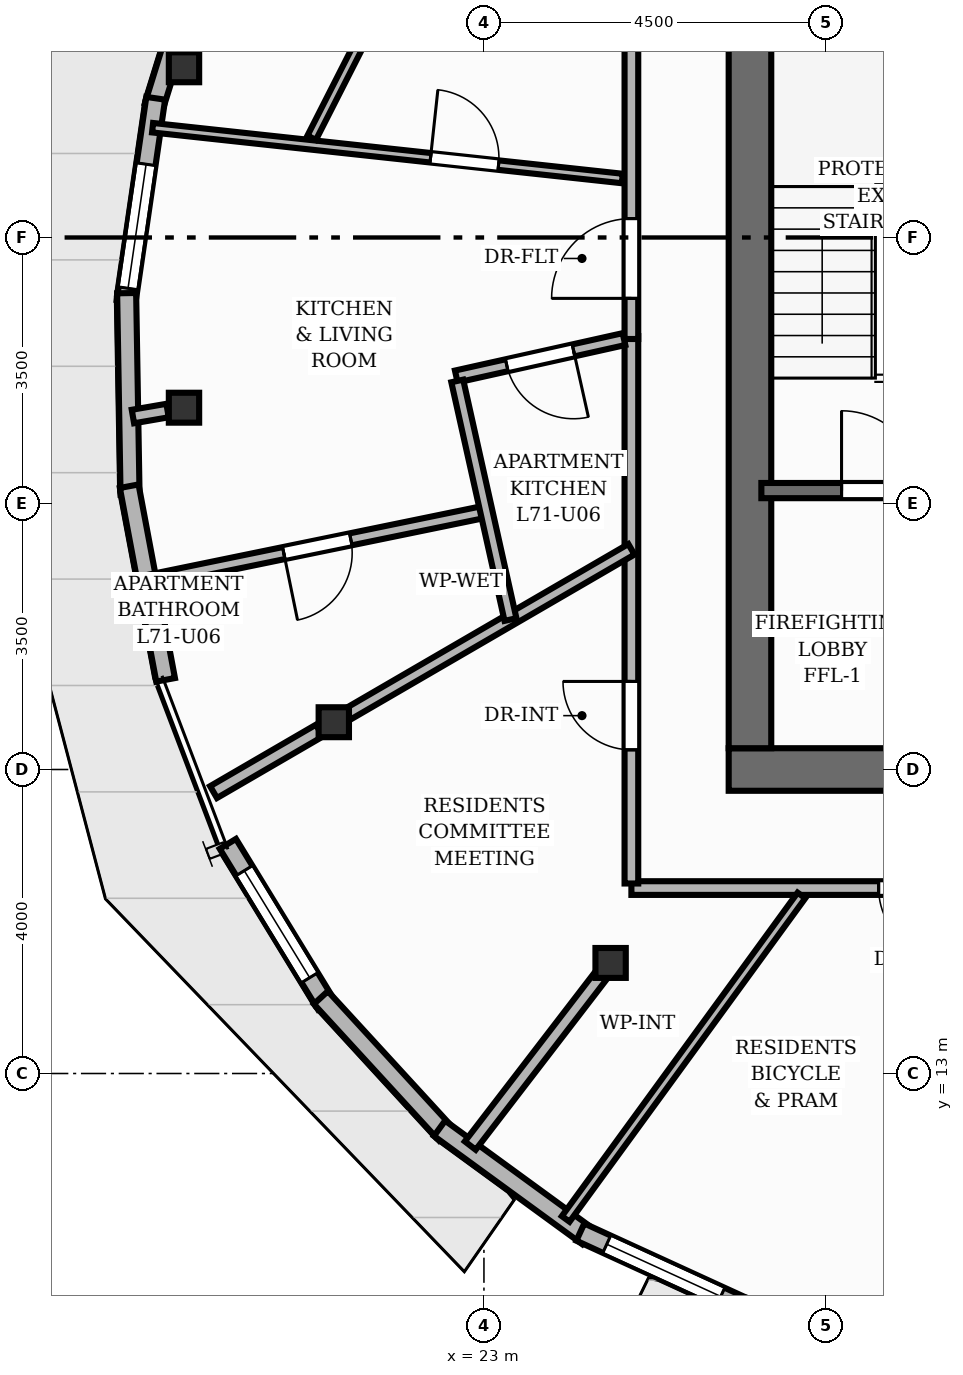
"""IFC4 building model, lengths in metres.
Left out: names, types, materials, properties, quantities, classifications, styles, units other than length and angle.
Written with IfcOpenShell. Run it as: python <this file> out.ifc"""

import sys

from ifc_helpers import new_model, si_unit, direction, frame, frame_2d, origin, origin_2d, place, context, subcontext, project, spatial, rectangle, i_section, extrude, element, fill, save


model = new_model("IFC4")
c1 = context("Model", 3, precision=1e-05, world=origin(), true_north=direction((0.0, 1.0)))
c2 = subcontext(c1, "Body", "Model", "MODEL_VIEW")
j1 = project(units=[si_unit("LENGTHUNIT", "METRE"), si_unit("PLANEANGLEUNIT", "RADIAN")], contexts=[c1])
p1 = place(None, origin())
s1 = spatial("IfcSite", under=j1, at=p1, CompositionType="ELEMENT")
p2 = place(p1, origin())
s2 = spatial("IfcBuilding", under=s1, at=p2, CompositionType="ELEMENT")
p3 = place(p2, frame((0.0, 0.0, 236.64)))
s3 = spatial("IfcBuildingStorey", under=s2, at=p3, CompositionType="ELEMENT", Elevation=236.64)
p4 = place(p3, frame((26.22, 17.0, 0.0), z_axis=(0.0, 0.0, 1.0), x_axis=(1.0, 0.0, 0.0)))
e1 = element("IfcWall", 1, at=p4, inside=s3, PredefinedType="SHEAR", context=c2, shape_type="SweptSolid", body=[
    extrude(rectangle(XDim=11.56, YDim=0.56, at=frame_2d((5.78, 0.0))), origin(), (0.0, 0.0, 1.0), 3.2),
])
p5 = place(p4, frame((2.28, 0.0, 0.0)))
e2 = element("IfcOpeningElement", 2, at=p5, cuts=e1, PredefinedType="OPENING", context=c2, shape_type="SweptSolid", body=[
    extrude(rectangle(XDim=1.1, YDim=2.15, at=frame_2d((0.55, 1.075))), frame((0.0, 0.29, 0.0), z_axis=(0.0, -1.0, 0.0), x_axis=(1.0, 0.0, 0.0)), (0.0, 0.0, 1.0), 0.58),
])
p6 = place(p4, frame((5.83, 0.0, 0.0)))
e3 = element("IfcOpeningElement", 3, at=p6, cuts=e1, PredefinedType="OPENING", context=c2, shape_type="SweptSolid", body=[
    extrude(rectangle(XDim=0.9, YDim=2.1, at=frame_2d((0.45, 1.05))), frame((0.0, 0.29, 0.0), z_axis=(0.0, -1.0, 0.0), x_axis=(1.0, 0.0, 0.0)), (0.0, 0.0, 1.0), 0.58),
])
p7 = place(p3, frame((26.5, 17.28, 0.0), z_axis=(0.0, 0.0, 1.0), x_axis=(0.0, 1.0, 0.0)))
e4 = element("IfcWall", 4, at=p7, inside=s3, PredefinedType="SHEAR", context=c2, shape_type="SweptSolid", body=[
    extrude(rectangle(XDim=13.44, YDim=0.56, at=frame_2d((6.72, 0.0))), origin(), (0.0, 0.0, 1.0), 3.2),
])
for number, where, z_axis, x_axis in (
    (5, (19.054, 26.24, 0.0), (0.0, 0.0, 1.0), (1.0, 0.0, 0.0)),
    (6, (19.054, 21.76, 0.0), (0.0, 0.0, 1.0), (1.0, 0.0, 0.0)),
    (7, (21.025, 17.622, 0.0), (0.0, 0.0, 1.0), (1.0, 0.0, 0.0)),
    (8, (24.667, 14.455, 0.0), (0.0, 0.0, 1.0), (1.0, 0.0, 0.0)),
):
    element("IfcColumn", number, at=place(p3, frame(where, z_axis=z_axis, x_axis=x_axis)), inside=s3, PredefinedType="COLUMN", context=c2, shape_type="SweptSolid", body=[
        extrude(i_section(OverallWidth=0.399, OverallDepth=0.394, WebThickness=0.023, FlangeThickness=0.037, at=origin_2d()), origin(), (0.0, 0.0, 1.0), 3.2),
    ])
p8 = place(p3, frame((18.657, 25.725, 0.0), z_axis=(0.0, 0.0, 1.0), x_axis=(0.29642164717, 0.955057174775, 0.0)))
e9 = element("IfcWall", 9, at=p8, inside=s3, PredefinedType="SOLIDWALL", context=c2, shape_type="SweptSolid", body=[
    extrude(rectangle(XDim=2.739, YDim=0.25, at=frame_2d((1.369, 0.0))), origin(), (0.0, 0.0, 1.0), 2.577),
])
p9 = place(p3, frame((18.292, 23.158, 0.0), z_axis=(0.0, 0.0, 1.0), x_axis=(0.144229466115, 0.989544269401, 0.0)))
e10 = element("IfcWall", 10, at=p9, inside=s3, PredefinedType="SOLIDWALL", context=c2, shape_type="SweptSolid", body=[
    extrude(rectangle(XDim=2.702, YDim=0.25, at=frame_2d((1.351, 0.0))), origin(), (0.0, 0.0, 1.0), 2.577),
])
p10 = place(p9, frame((0.175, 0.0, 0.85)))
e11 = element("IfcOpeningElement", 11, at=p10, cuts=e10, PredefinedType="OPENING", context=c2, shape_type="SweptSolid", body=[
    extrude(rectangle(XDim=1.65, YDim=1.55, at=frame_2d((0.825, 0.775))), frame((0.0, 0.135, 0.0), z_axis=(0.0, -1.0, 0.0), x_axis=(1.0, 0.0, 0.0)), (0.0, 0.0, 1.0), 0.27),
])
p11 = place(p3, frame((18.344, 20.617, 0.0), z_axis=(0.0, 0.0, 1.0), x_axis=(-0.016945158089, 0.999856420501, 0.0)))
e12 = element("IfcWall", 12, at=p11, inside=s3, PredefinedType="SOLIDWALL", context=c2, shape_type="SweptSolid", body=[
    extrude(rectangle(XDim=2.651, YDim=0.25, at=frame_2d((1.326, 0.0))), origin(), (0.0, 0.0, 1.0), 2.96),
])
p12 = place(p3, frame((18.812, 18.18, 0.0), z_axis=(0.0, 0.0, 1.0), x_axis=(-0.184783228791, 0.982779302976, 0.0)))
e13 = element("IfcWall", 13, at=p12, inside=s3, PredefinedType="SOLIDWALL", context=c2, shape_type="SweptSolid", body=[
    extrude(rectangle(XDim=2.592, YDim=0.25, at=frame_2d((1.296, 0.0))), origin(), (0.0, 0.0, 1.0), 2.96),
])
p13 = place(p3, frame((20.923, 13.907, 0.0), z_axis=(0.0, 0.0, 1.0), x_axis=(-0.52150580366, 0.853247734687, 0.0)))
e14 = element("IfcWall", 14, at=p13, inside=s3, PredefinedType="SOLIDWALL", context=c2, shape_type="SweptSolid", body=[
    extrude(rectangle(XDim=2.478, YDim=0.25, at=frame_2d((1.239, 0.0))), origin(), (0.0, 0.0, 1.0), 2.96),
])
p14 = place(p13, frame((0.414, 0.0, 0.85)))
e15 = element("IfcOpeningElement", 15, at=p14, cuts=e14, PredefinedType="OPENING", context=c2, shape_type="SweptSolid", body=[
    extrude(rectangle(XDim=1.65, YDim=1.55, at=frame_2d((0.825, 0.775))), frame((0.0, 0.135, 0.0), z_axis=(0.0, -1.0, 0.0), x_axis=(1.0, 0.0, 0.0)), (0.0, 0.0, 1.0), 0.27),
])
p15 = place(p3, frame((22.501, 12.202, 0.0), z_axis=(0.0, 0.0, 1.0), x_axis=(-0.675783606308, 0.737100072884, 0.0)))
e16 = element("IfcWall", 16, at=p15, inside=s3, PredefinedType="SOLIDWALL", context=c2, shape_type="SweptSolid", body=[
    extrude(rectangle(XDim=2.437, YDim=0.25, at=frame_2d((1.218, 0.0))), origin(), (0.0, 0.0, 1.0), 2.96),
])
p16 = place(p3, frame((24.367, 10.855, 0.0), z_axis=(0.0, 0.0, 1.0), x_axis=(-0.80791325233, 0.589301431111, 0.0)))
e17 = element("IfcWall", 17, at=p16, inside=s3, PredefinedType="SOLIDWALL", context=c2, shape_type="SweptSolid", body=[
    extrude(rectangle(XDim=2.415, YDim=0.25, at=frame_2d((1.207, 0.0))), origin(), (0.0, 0.0, 1.0), 2.96),
])
p17 = place(p3, frame((26.463, 9.907, 0.0), z_axis=(0.0, 0.0, 1.0), x_axis=(-0.909098330543, 0.416581595133, 0.0)))
e18 = element("IfcWall", 18, at=p17, inside=s3, PredefinedType="SOLIDWALL", context=c2, shape_type="SweptSolid", body=[
    extrude(rectangle(XDim=2.415, YDim=0.25, at=frame_2d((1.207, 0.0))), origin(), (0.0, 0.0, 1.0), 2.96),
])
p18 = place(p17, frame((0.382, 0.0, 0.85)))
e19 = element("IfcOpeningElement", 19, at=p18, cuts=e18, PredefinedType="OPENING", context=c2, shape_type="SweptSolid", body=[
    extrude(rectangle(XDim=1.65, YDim=1.55, at=frame_2d((0.825, 0.775))), frame((0.0, 0.135, 0.0), z_axis=(0.0, -1.0, 0.0), x_axis=(1.0, 0.0, 0.0)), (0.0, 0.0, 1.0), 0.27),
])
p19 = place(p3, frame((26.65, 20.67, 0.0), z_axis=(0.0, 0.0, 1.0), x_axis=(1.0, 0.0, 0.0)))
e20 = element("IfcWall", 20, at=p19, inside=s3, PredefinedType="SHEAR", context=c2, shape_type="SweptSolid", body=[
    extrude(rectangle(XDim=3.24, YDim=0.2, at=frame_2d((1.62, 0.0))), origin(), (0.0, 0.0, 1.0), 3.2),
])
p20 = place(p19, frame((1.055, 0.0, 0.0)))
e21 = element("IfcOpeningElement", 21, at=p20, cuts=e20, PredefinedType="OPENING", context=c2, shape_type="SweptSolid", body=[
    extrude(rectangle(XDim=1.05, YDim=2.15, at=frame_2d((0.525, 1.075))), frame((0.0, 0.11, 0.0), z_axis=(0.0, -1.0, 0.0), x_axis=(1.0, 0.0, 0.0)), (0.0, 0.0, 1.0), 0.22),
])
p21 = place(p3, frame((18.837, 21.723, 0.0), z_axis=(0.0, 0.0, 1.0), x_axis=(-0.985450971837, -0.169959942652, 0.0)))
e22 = element("IfcWall", 22, at=p21, inside=s3, PredefinedType="PARTITIONING", context=c2, shape_type="SweptSolid", body=[
    extrude(rectangle(XDim=0.463, YDim=0.18, at=frame_2d((0.231, 0.0))), origin(), (0.0, 0.0, 1.0), 2.404),
])
p22 = place(p3, frame((20.835, 17.512, 0.0), z_axis=(0.0, 0.0, 1.0), x_axis=(-0.864591417654, -0.50247555216, 0.0)))
e23 = element("IfcWall", 23, at=p22, inside=s3, PredefinedType="PARTITIONING", context=c2, shape_type="SweptSolid", body=[
    extrude(rectangle(XDim=1.611, YDim=0.18, at=frame_2d((0.805, 0.0))), origin(), (0.0, 0.0, 1.0), 2.404),
])
p23 = place(p3, frame((24.533, 14.281, 0.0), z_axis=(0.0, 0.0, 1.0), x_axis=(-0.609215330611, -0.793004842954, 0.0)))
e24 = element("IfcWall", 24, at=p23, inside=s3, PredefinedType="PARTITIONING", context=c2, shape_type="SweptSolid", body=[
    extrude(rectangle(XDim=2.811, YDim=0.18, at=frame_2d((1.405, 0.0))), origin(), (0.0, 0.0, 1.0), 2.404),
])
p24 = place(p3, frame((33.428, 15.44, 0.0), z_axis=(0.0, 0.0, 1.0), x_axis=(-1.0, 0.0, 0.0)))
e25 = element("IfcWall", 25, at=p24, inside=s3, PredefinedType="PARTITIONING", context=c2, shape_type="SweptSolid", body=[
    extrude(rectangle(XDim=8.489, YDim=0.18, at=frame_2d((4.244, 0.0))), origin(), (0.0, 0.0, 1.0), 2.955),
])
p25 = place(p24, frame((4.336, 0.0, 0.0)))
e26 = element("IfcOpeningElement", 26, at=p25, cuts=e25, PredefinedType="OPENING", context=c2, shape_type="SweptSolid", body=[
    extrude(rectangle(XDim=0.9, YDim=2.1, at=frame_2d((0.45, 1.05))), frame((0.0, 0.1, 0.0), z_axis=(0.0, -1.0, 0.0), x_axis=(1.0, 0.0, 0.0)), (0.0, 0.0, 1.0), 0.2),
])
p26 = place(p3, frame((24.94, 15.5, 0.0), z_axis=(0.0, 0.0, 1.0), x_axis=(0.0, 1.0, 0.0)))
e27 = element("IfcWall", 27, at=p26, inside=s3, PredefinedType="PARTITIONING", context=c2, shape_type="SweptSolid", body=[
    extrude(rectangle(XDim=7.203, YDim=0.18, at=frame_2d((3.602, 0.0))), origin(), (0.0, 0.0, 1.0), 2.955),
])
p27 = place(p26, frame((1.759, 0.0, 0.0)))
e28 = element("IfcOpeningElement", 28, at=p27, cuts=e27, PredefinedType="OPENING", context=c2, shape_type="SweptSolid", body=[
    extrude(rectangle(XDim=0.9, YDim=2.1, at=frame_2d((0.45, 1.05))), frame((0.0, 0.1, 0.0), z_axis=(0.0, -1.0, 0.0), x_axis=(1.0, 0.0, 0.0)), (0.0, 0.0, 1.0), 0.2),
])
p28 = place(p3, frame((24.94, 22.664, 0.0), z_axis=(0.0, 0.0, 1.0), x_axis=(0.0, 1.0, 0.0)))
e29 = element("IfcWall", 29, at=p28, inside=s3, PredefinedType="PARTITIONING", context=c2, shape_type="SweptSolid", body=[
    extrude(rectangle(XDim=9.896, YDim=0.18, at=frame_2d((4.948, 0.0))), origin(), (0.0, 0.0, 1.0), 2.955),
])
p29 = place(p28, frame((0.535, 0.0, 0.0)))
e30 = element("IfcOpeningElement", 30, at=p29, cuts=e29, PredefinedType="OPENING", context=c2, shape_type="SweptSolid", body=[
    extrude(rectangle(XDim=1.05, YDim=2.15, at=frame_2d((0.525, 1.075))), frame((0.0, 0.1, 0.0), z_axis=(0.0, -1.0, 0.0), x_axis=(1.0, 0.0, 0.0)), (0.0, 0.0, 1.0), 0.2),
])
p30 = place(p3, frame((24.076, 11.086, 0.0), z_axis=(0.0, 0.0, 1.0), x_axis=(0.588877051888, 0.808222628834, 0.0)))
e31 = element("IfcWall", 31, at=p30, inside=s3, PredefinedType="PARTITIONING", context=c2, shape_type="SweptSolid", body=[
    extrude(rectangle(XDim=5.267, YDim=0.125, at=frame_2d((2.633, 0.0))), origin(), (0.0, 0.0, 1.0), 2.692),
])
p31 = place(p3, frame((21.21, 17.729, 0.0), z_axis=(0.0, 0.0, 1.0), x_axis=(0.864584371019, 0.502487676854, 0.0)))
e32 = element("IfcWall", 32, at=p31, inside=s3, PredefinedType="PLUMBINGWALL", context=c2, shape_type="SweptSolid", body=[
    extrude(rectangle(XDim=4.314, YDim=0.16, at=frame_2d((2.157, 0.0))), origin(), (0.0, 0.0, 1.0), 2.404),
])
p32 = place(p3, frame((23.032, 20.395, 0.0), z_axis=(0.0, 0.0, 1.0), x_axis=(-0.979533467042, -0.201281362638, 0.0)))
e33 = element("IfcWall", 33, at=p32, inside=s3, PredefinedType="PLUMBINGWALL", context=c2, shape_type="SweptSolid", body=[
    extrude(rectangle(XDim=4.542, YDim=0.16, at=frame_2d((2.271, 0.0))), origin(), (0.0, 0.0, 1.0), 2.692),
])
p33 = place(p32, frame((1.821, 0.0, 0.0)))
e34 = element("IfcOpeningElement", 34, at=p33, cuts=e33, PredefinedType="OPENING", context=c2, shape_type="SweptSolid", body=[
    extrude(rectangle(XDim=0.9, YDim=2.1, at=frame_2d((0.45, 1.05))), frame((0.0, 0.09, 0.0), z_axis=(0.0, -1.0, 0.0), x_axis=(1.0, 0.0, 0.0)), (0.0, 0.0, 1.0), 0.18),
])
p34 = place(p3, frame((18.64, 25.445, 0.0), z_axis=(0.0, 0.0, 1.0), x_axis=(0.994206026696, -0.107491285604, 0.0)))
e35 = element("IfcWall", 35, at=p34, inside=s3, PredefinedType="PARTITIONING", context=c2, shape_type="SweptSolid", body=[
    extrude(rectangle(XDim=6.217, YDim=0.125, at=frame_2d((3.108, 0.0))), origin(), (0.0, 0.0, 1.0), 2.955),
])
p35 = place(p34, frame((3.678, 0.0, 0.0)))
e36 = element("IfcOpeningElement", 36, at=p35, cuts=e35, PredefinedType="OPENING", context=c2, shape_type="SweptSolid", body=[
    extrude(rectangle(XDim=0.9, YDim=2.1, at=frame_2d((0.45, 1.05))), frame((0.0, 0.073, 0.0), z_axis=(0.0, -1.0, 0.0), x_axis=(1.0, 0.0, 0.0)), (0.0, 0.0, 1.0), 0.145),
])
p36 = place(p3, frame((24.842, 22.663, 0.0), z_axis=(0.0, 0.0, 1.0), x_axis=(-0.976008847289, -0.21773086601, 0.0)))
e37 = element("IfcWall", 37, at=p36, inside=s3, PredefinedType="PLUMBINGWALL", context=c2, shape_type="SweptSolid", body=[
    extrude(rectangle(XDim=2.26, YDim=0.16, at=frame_2d((1.13, 0.0))), origin(), (0.0, 0.0, 1.0), 2.404),
])
p37 = place(p36, frame((0.68, 0.0, 0.0)))
e38 = element("IfcOpeningElement", 38, at=p37, cuts=e37, PredefinedType="OPENING", context=c2, shape_type="SweptSolid", body=[
    extrude(rectangle(XDim=0.9, YDim=2.1, at=frame_2d((0.45, 1.05))), frame((0.0, 0.09, 0.0), z_axis=(0.0, -1.0, 0.0), x_axis=(1.0, 0.0, 0.0)), (0.0, 0.0, 1.0), 0.18),
])
p38 = place(p3, frame((22.649, 22.112, 0.0), z_axis=(0.0, 0.0, 1.0), x_axis=(0.21761353054, -0.97603501542, 0.0)))
e39 = element("IfcWall", 39, at=p38, inside=s3, PredefinedType="PLUMBINGWALL", context=c2, shape_type="SweptSolid", body=[
    extrude(rectangle(XDim=3.217, YDim=0.16, at=frame_2d((1.608, 0.0))), origin(), (0.0, 0.0, 1.0), 2.955),
])
p39 = place(p3, frame((20.734, 25.312, 0.0), z_axis=(0.0, 0.0, 1.0), x_axis=(0.45353588766, 0.891238014564, 0.0)))
e40 = element("IfcWall", 40, at=p39, inside=s3, PredefinedType="PARTITIONING", context=c2, shape_type="SweptSolid", body=[
    extrude(rectangle(XDim=8.912, YDim=0.125, at=frame_2d((4.456, 0.0))), origin(), (0.0, 0.0, 1.0), 2.955),
])
p40 = place(p39, frame((4.006, 0.0, 0.0)))
e41 = element("IfcOpeningElement", 41, at=p40, cuts=e40, PredefinedType="OPENING", context=c2, shape_type="SweptSolid", body=[
    extrude(rectangle(XDim=0.9, YDim=2.1, at=frame_2d((0.45, 1.05))), frame((0.0, 0.073, 0.0), z_axis=(0.0, -1.0, 0.0), x_axis=(1.0, 0.0, 0.0)), (0.0, 0.0, 1.0), 0.145),
])
p41 = place(p10, origin())
e42 = element("IfcWindow", 42, at=p41, inside=s3, PartitioningType="SINGLE_PANEL", PredefinedType="WINDOW", context=c2, shape_type="SweptSolid", body=[
    extrude(rectangle(XDim=1.65, YDim=1.55, at=frame_2d((0.825, 0.775))), frame((0.0, 0.03, 0.0), z_axis=(0.0, -1.0, 0.0), x_axis=(1.0, 0.0, 0.0)), (0.0, 0.0, 1.0), 0.06),
])
fill(e11, e42)
p42 = place(p14, origin())
e43 = element("IfcWindow", 43, at=p42, inside=s3, PartitioningType="SINGLE_PANEL", PredefinedType="WINDOW", context=c2, shape_type="SweptSolid", body=[
    extrude(rectangle(XDim=1.65, YDim=1.55, at=frame_2d((0.825, 0.775))), frame((0.0, 0.03, 0.0), z_axis=(0.0, -1.0, 0.0), x_axis=(1.0, 0.0, 0.0)), (0.0, 0.0, 1.0), 0.06),
])
fill(e15, e43)
p43 = place(p18, origin())
e44 = element("IfcWindow", 44, at=p43, inside=s3, PartitioningType="SINGLE_PANEL", PredefinedType="WINDOW", context=c2, shape_type="SweptSolid", body=[
    extrude(rectangle(XDim=1.65, YDim=1.55, at=frame_2d((0.825, 0.775))), frame((0.0, 0.03, 0.0), z_axis=(0.0, -1.0, 0.0), x_axis=(1.0, 0.0, 0.0)), (0.0, 0.0, 1.0), 0.06),
])
fill(e19, e44)
p44 = place(p20, origin())
e45 = element("IfcDoor", 45, at=p44, inside=s3, OperationType="SINGLE_SWING_LEFT", PredefinedType="DOOR", context=c2, shape_type="SweptSolid", body=[
    extrude(rectangle(XDim=1.05, YDim=2.15, at=frame_2d((0.525, 1.075))), frame((0.0, 0.025, 0.0), z_axis=(0.0, -1.0, 0.0), x_axis=(1.0, 0.0, 0.0)), (0.0, 0.0, 1.0), 0.05),
])
fill(e21, e45)
p45 = place(p25, origin())
e46 = element("IfcDoor", 46, at=p45, inside=s3, OperationType="SINGLE_SWING_LEFT", PredefinedType="DOOR", context=c2, shape_type="SweptSolid", body=[
    extrude(rectangle(XDim=0.9, YDim=2.1, at=frame_2d((0.45, 1.05))), frame((0.0, 0.025, 0.0), z_axis=(0.0, -1.0, 0.0), x_axis=(1.0, 0.0, 0.0)), (0.0, 0.0, 1.0), 0.05),
])
fill(e26, e46)
p46 = place(p27, origin())
e47 = element("IfcDoor", 47, at=p46, inside=s3, OperationType="SINGLE_SWING_RIGHT", PredefinedType="DOOR", context=c2, shape_type="SweptSolid", body=[
    extrude(rectangle(XDim=0.9, YDim=2.1, at=frame_2d((0.45, 1.05))), frame((0.0, 0.025, 0.0), z_axis=(0.0, -1.0, 0.0), x_axis=(1.0, 0.0, 0.0)), (0.0, 0.0, 1.0), 0.05),
])
fill(e28, e47)
p47 = place(p29, origin())
e48 = element("IfcDoor", 48, at=p47, inside=s3, OperationType="SINGLE_SWING_LEFT", PredefinedType="DOOR", context=c2, shape_type="SweptSolid", body=[
    extrude(rectangle(XDim=1.05, YDim=2.15, at=frame_2d((0.525, 1.075))), frame((0.0, 0.025, 0.0), z_axis=(0.0, -1.0, 0.0), x_axis=(1.0, 0.0, 0.0)), (0.0, 0.0, 1.0), 0.05),
])
fill(e30, e48)
p48 = place(p33, origin())
e49 = element("IfcDoor", 49, at=p48, inside=s3, OperationType="SINGLE_SWING_RIGHT", PredefinedType="DOOR", context=c2, shape_type="SweptSolid", body=[
    extrude(rectangle(XDim=0.9, YDim=2.1, at=frame_2d((0.45, 1.05))), frame((0.0, 0.025, 0.0), z_axis=(0.0, -1.0, 0.0), x_axis=(1.0, 0.0, 0.0)), (0.0, 0.0, 1.0), 0.05),
])
fill(e34, e49)
p49 = place(p35, origin())
e50 = element("IfcDoor", 50, at=p49, inside=s3, OperationType="SINGLE_SWING_LEFT", PredefinedType="DOOR", context=c2, shape_type="SweptSolid", body=[
    extrude(rectangle(XDim=0.9, YDim=2.1, at=frame_2d((0.45, 1.05))), frame((0.0, 0.025, 0.0), z_axis=(0.0, -1.0, 0.0), x_axis=(1.0, 0.0, 0.0)), (0.0, 0.0, 1.0), 0.05),
])
fill(e36, e50)
p50 = place(p37, origin())
e51 = element("IfcDoor", 51, at=p50, inside=s3, OperationType="SINGLE_SWING_LEFT", PredefinedType="DOOR", context=c2, shape_type="SweptSolid", body=[
    extrude(rectangle(XDim=0.9, YDim=2.1, at=frame_2d((0.45, 1.05))), frame((0.0, 0.025, 0.0), z_axis=(0.0, -1.0, 0.0), x_axis=(1.0, 0.0, 0.0)), (0.0, 0.0, 1.0), 0.05),
])
fill(e38, e51)
save(model, sys.argv[1])
